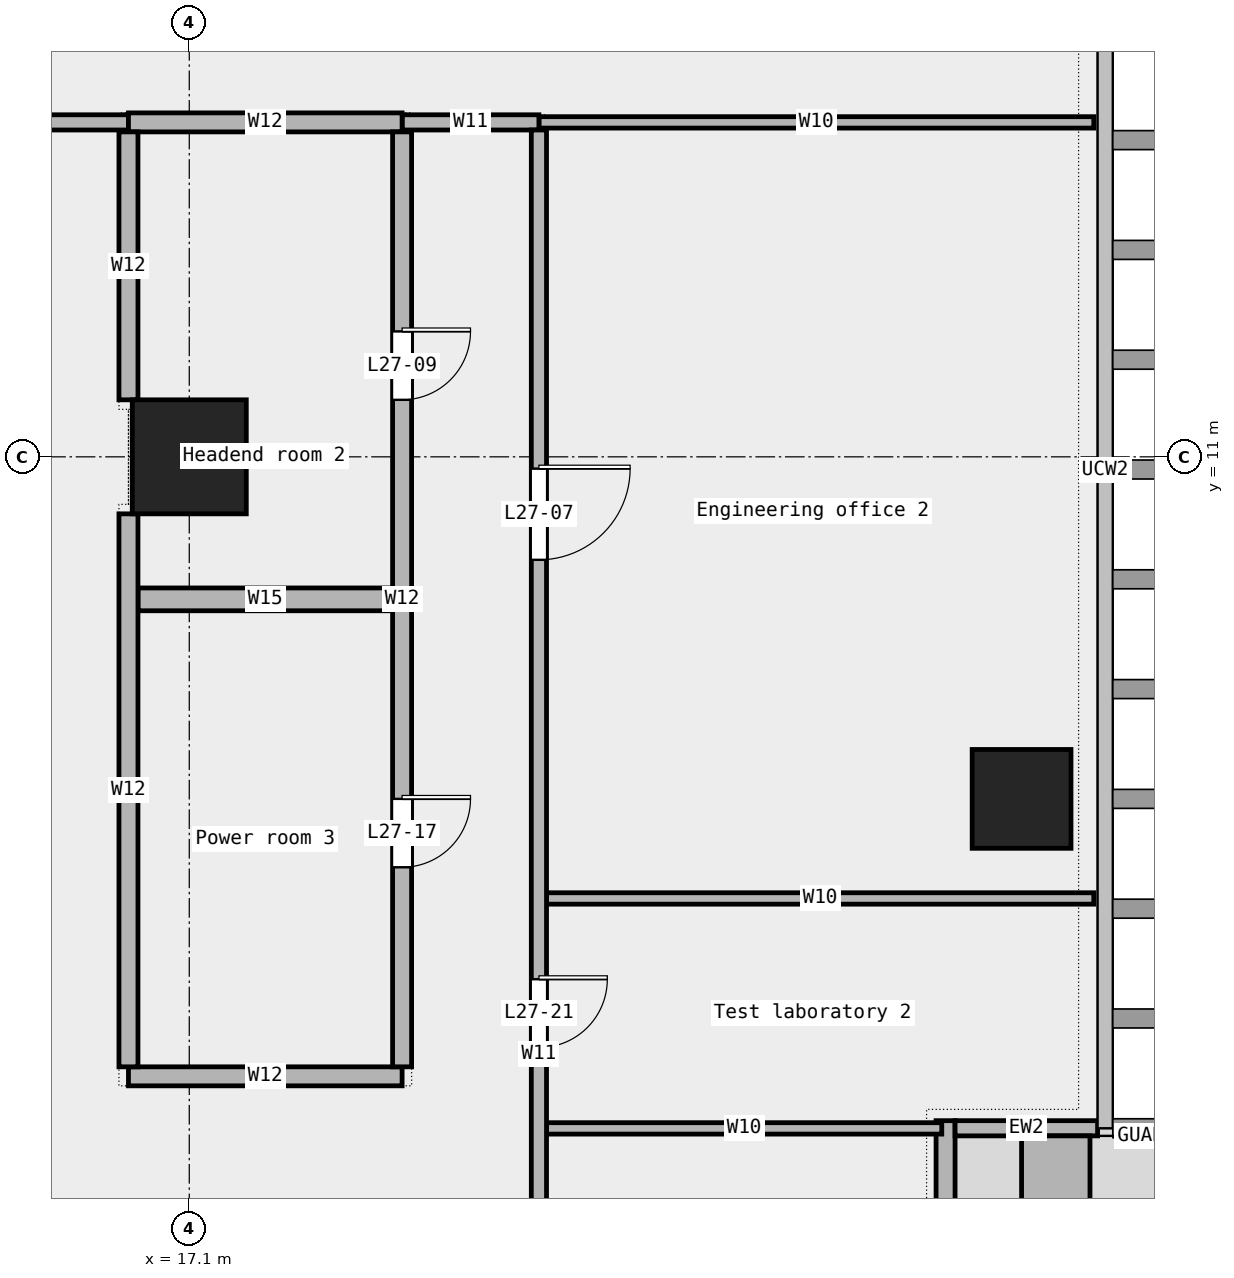
"""IFC4 building model, lengths in metres.
Left out: names, types, materials, properties, quantities, classifications, styles, units other than length and angle.
Written with IfcOpenShell. Run it as: python <this file> out.ifc"""

import sys

from ifc_helpers import new_model, si_unit, direction, frame, frame_2d, origin, origin_2d, place, context, subcontext, project, spatial, rectangle, extrude, element, fill, save


model = new_model("IFC4")
c1 = context("Model", 3, precision=1e-05, world=origin(), true_north=direction((0.0, 1.0)))
c2 = subcontext(c1, "Body", "Model", "MODEL_VIEW")
j1 = project(units=[si_unit("LENGTHUNIT", "METRE"), si_unit("PLANEANGLEUNIT", "RADIAN")], contexts=[c1])
p1 = place(None, origin())
s1 = spatial("IfcSite", under=j1, at=p1, CompositionType="ELEMENT")
p2 = place(p1, origin())
s2 = spatial("IfcBuilding", under=s1, at=p2, CompositionType="ELEMENT")
p3 = place(p2, frame((0.0, 0.0, 135.1)))
s3 = spatial("IfcBuildingStorey", under=s2, at=p3, CompositionType="ELEMENT", Elevation=135.1)
p4 = place(p3, frame((28.05, 6.5, 0.0), z_axis=(0.0, 0.0, 1.0), x_axis=(1.0, 0.0, 0.0)))
e1 = element("IfcColumn", 1, at=p4, inside=s3, PredefinedType="COLUMN", context=c2, shape_type="SweptSolid", body=[
    extrude(rectangle(XDim=1.3, YDim=1.3, at=origin_2d()), origin(), (0.0, 0.0, 1.0), 4.05),
])
p5 = place(p3, frame((17.1, 11.0, 0.0), z_axis=(0.0, 0.0, 1.0), x_axis=(1.0, 0.0, 0.0)))
e2 = element("IfcColumn", 2, at=p5, inside=s3, PredefinedType="COLUMN", context=c2, shape_type="SweptSolid", body=[
    extrude(rectangle(XDim=1.5, YDim=1.5, at=origin_2d()), origin(), (0.0, 0.0, 1.0), 4.05),
])
p6 = place(p3, frame((27.05, -10.933, 0.0), z_axis=(0.0, 0.0, 1.0), x_axis=(0.0, 1.0, 0.0)))
e3 = element("IfcWall", 3, at=p6, inside=s3, PredefinedType="STANDARD", context=c2, shape_type="SweptSolid", body=[
    extrude(rectangle(XDim=13.2, YDim=0.25, at=frame_2d((6.6, 0.0))), origin(), (0.0, 0.0, 1.0), 4.05),
])
p7 = place(p6, frame((1.5, 0.0, 0.45)))
e4 = element("IfcOpeningElement", 4, at=p7, cuts=e3, PredefinedType="OPENING", context=c2, shape_type="SweptSolid", body=[
    extrude(rectangle(XDim=1.5, YDim=3.0, at=frame_2d((0.75, 1.5))), frame((0.0, 0.137, 0.0), z_axis=(0.0, -1.0, 0.0), x_axis=(1.0, 0.0, 0.0)), (0.0, 0.0, 1.0), 0.274),
])
p8 = place(p6, frame((5.75, 0.0, 0.0)))
e5 = element("IfcOpeningElement", 5, at=p8, cuts=e3, PredefinedType="OPENING", context=c2, shape_type="SweptSolid", body=[
    extrude(rectangle(XDim=1.8, YDim=2.4, at=frame_2d((0.9, 1.2))), frame((0.0, 0.137, 0.0), z_axis=(0.0, -1.0, 0.0), x_axis=(1.0, 0.0, 0.0)), (0.0, 0.0, 1.0), 0.274),
])
p9 = place(p6, frame((10.25, 0.0, 0.45)))
e6 = element("IfcOpeningElement", 6, at=p9, cuts=e3, PredefinedType="OPENING", context=c2, shape_type="SweptSolid", body=[
    extrude(rectangle(XDim=1.5, YDim=3.0, at=frame_2d((0.75, 1.5))), frame((0.0, 0.137, 0.0), z_axis=(0.0, -1.0, 0.0), x_axis=(1.0, 0.0, 0.0)), (0.0, 0.0, 1.0), 0.274),
])
p10 = place(p3, frame((29.05, 2.167, 0.0), z_axis=(0.0, 0.0, 1.0), x_axis=(-1.0, 0.0, 0.0)))
e7 = element("IfcWall", 7, at=p10, inside=s3, PredefinedType="STANDARD", context=c2, shape_type="SweptSolid", body=[
    extrude(rectangle(XDim=1.875, YDim=0.2, at=frame_2d((0.938, 0.0))), origin(), (0.0, 0.0, 1.0), 4.05),
])
p11 = place(p3, frame((28.5, -1.533, 0.0), z_axis=(0.0, 0.0, 1.0), x_axis=(0.0, 1.0, 0.0)))
e8 = element("IfcWall", 8, at=p11, inside=s3, PredefinedType="STANDARD", context=c2, shape_type="SweptSolid", body=[
    extrude(rectangle(XDim=3.6, YDim=0.9, at=frame_2d((1.8, 0.0))), origin(), (0.0, 0.0, 1.0), 0.7),
])
p12 = place(p3, frame((21.8, 2.165, 0.0), z_axis=(0.0, 0.0, 1.0), x_axis=(1.0, 0.0, 0.0)))
e9 = element("IfcWall", 9, at=p12, inside=s3, PredefinedType="PARTITIONING", context=c2, shape_type="SweptSolid", body=[
    extrude(rectangle(XDim=5.2, YDim=0.15, at=frame_2d((2.6, 0.0))), origin(), (0.0, 0.0, 1.0), 4.05),
])
p13 = place(p3, frame((16.3, 2.85, 0.0), z_axis=(0.0, 0.0, 1.0), x_axis=(1.0, 0.0, 0.0)))
e10 = element("IfcWall", 10, at=p13, inside=s3, PredefinedType="PARTITIONING", context=c2, shape_type="SweptSolid", body=[
    extrude(rectangle(XDim=3.6, YDim=0.25, at=frame_2d((1.8, 0.0))), origin(), (0.0, 0.0, 1.0), 4.05),
])
p14 = place(p3, frame((21.8, 5.19, 0.0), z_axis=(0.0, 0.0, 1.0), x_axis=(1.0, 0.0, 0.0)))
e11 = element("IfcWall", 11, at=p14, inside=s3, PredefinedType="PARTITIONING", context=c2, shape_type="SweptSolid", body=[
    extrude(rectangle(XDim=7.2, YDim=0.15, at=frame_2d((3.6, 0.0))), origin(), (0.0, 0.0, 1.0), 4.05),
])
p15 = place(p3, frame((16.425, 9.125, 0.0), z_axis=(0.0, 0.0, 1.0), x_axis=(1.0, 0.0, 0.0)))
e12 = element("IfcWall", 12, at=p15, inside=s3, PredefinedType="PARTITIONING", context=c2, shape_type="SweptSolid", body=[
    extrude(rectangle(XDim=3.35, YDim=0.3, at=frame_2d((1.675, 0.0))), origin(), (0.0, 0.0, 1.0), 4.05),
])
p16 = place(p3, frame((21.7, 15.4, 0.0), z_axis=(0.0, 0.0, 1.0), x_axis=(1.0, 0.0, 0.0)))
e13 = element("IfcWall", 13, at=p16, inside=s3, PredefinedType="PARTITIONING", context=c2, shape_type="SweptSolid", body=[
    extrude(rectangle(XDim=7.3, YDim=0.15, at=frame_2d((3.65, 0.0))), origin(), (0.0, 0.0, 1.0), 4.05),
])
p17 = place(p3, frame((9.6, 15.4, 0.0), z_axis=(0.0, 0.0, 1.0), x_axis=(1.0, 0.0, 0.0)))
e14 = element("IfcWall", 14, at=p17, inside=s3, PredefinedType="PARTITIONING", context=c2, shape_type="SweptSolid", body=[
    extrude(rectangle(XDim=6.7, YDim=0.2, at=frame_2d((3.35, 0.0))), origin(), (0.0, 0.0, 1.0), 4.05),
])
p18 = place(p17, frame((2.45, 0.0, 0.0)))
e15 = element("IfcOpeningElement", 15, at=p18, cuts=e14, PredefinedType="OPENING", context=c2, shape_type="SweptSolid", body=[
    extrude(rectangle(XDim=1.8, YDim=2.1, at=frame_2d((0.9, 1.05))), frame((0.0, 0.112, 0.0), z_axis=(0.0, -1.0, 0.0), x_axis=(1.0, 0.0, 0.0)), (0.0, 0.0, 1.0), 0.224),
])
p19 = place(p3, frame((19.9, 15.4, 0.0), z_axis=(0.0, 0.0, 1.0), x_axis=(1.0, 0.0, 0.0)))
e16 = element("IfcWall", 16, at=p19, inside=s3, PredefinedType="PARTITIONING", context=c2, shape_type="SweptSolid", body=[
    extrude(rectangle(XDim=1.8, YDim=0.2, at=frame_2d((0.9, 0.0))), origin(), (0.0, 0.0, 1.0), 4.05),
])
p20 = place(p3, frame((16.3, 15.4, 0.0), z_axis=(0.0, 0.0, 1.0), x_axis=(1.0, 0.0, 0.0)))
e17 = element("IfcWall", 17, at=p20, inside=s3, PredefinedType="PARTITIONING", context=c2, shape_type="SweptSolid", body=[
    extrude(rectangle(XDim=3.6, YDim=0.25, at=frame_2d((1.8, 0.0))), origin(), (0.0, 0.0, 1.0), 4.05),
])
p21 = place(p3, frame((16.3, 2.975, 0.0), z_axis=(0.0, 0.0, 1.0), x_axis=(0.0, 1.0, 0.0)))
e18 = element("IfcWall", 18, at=p21, inside=s3, PredefinedType="PARTITIONING", context=c2, shape_type="SweptSolid", body=[
    extrude(rectangle(XDim=7.275, YDim=0.25, at=frame_2d((3.637, 0.0))), origin(), (0.0, 0.0, 1.0), 4.05),
])
p22 = place(p3, frame((16.3, 11.75, 0.0), z_axis=(0.0, 0.0, 1.0), x_axis=(0.0, 1.0, 0.0)))
e19 = element("IfcWall", 19, at=p22, inside=s3, PredefinedType="PARTITIONING", context=c2, shape_type="SweptSolid", body=[
    extrude(rectangle(XDim=3.525, YDim=0.25, at=frame_2d((1.762, 0.0))), origin(), (0.0, 0.0, 1.0), 4.05),
])
p23 = place(p3, frame((19.9, 2.975, 0.0), z_axis=(0.0, 0.0, 1.0), x_axis=(0.0, 1.0, 0.0)))
e20 = element("IfcWall", 20, at=p23, inside=s3, PredefinedType="PARTITIONING", context=c2, shape_type="SweptSolid", body=[
    extrude(rectangle(XDim=12.3, YDim=0.25, at=frame_2d((6.15, 0.0))), origin(), (0.0, 0.0, 1.0), 4.05),
])
p24 = place(p23, frame((8.775, 0.0, 0.0)))
e21 = element("IfcOpeningElement", 21, at=p24, cuts=e20, PredefinedType="OPENING", context=c2, shape_type="SweptSolid", body=[
    extrude(rectangle(XDim=0.9, YDim=2.1, at=frame_2d((0.45, 1.05))), frame((0.0, 0.137, 0.0), z_axis=(0.0, -1.0, 0.0), x_axis=(1.0, 0.0, 0.0)), (0.0, 0.0, 1.0), 0.274),
])
p25 = place(p23, frame((2.625, 0.0, 0.0)))
e22 = element("IfcOpeningElement", 22, at=p25, cuts=e20, PredefinedType="OPENING", context=c2, shape_type="SweptSolid", body=[
    extrude(rectangle(XDim=0.9, YDim=2.1, at=frame_2d((0.45, 1.05))), frame((0.0, 0.137, 0.0), z_axis=(0.0, -1.0, 0.0), x_axis=(1.0, 0.0, 0.0)), (0.0, 0.0, 1.0), 0.274),
])
p26 = place(p3, frame((21.7, -9.0, 0.0), z_axis=(0.0, 0.0, 1.0), x_axis=(0.0, 1.0, 0.0)))
e23 = element("IfcWall", 23, at=p26, inside=s3, PredefinedType="PARTITIONING", context=c2, shape_type="SweptSolid", body=[
    extrude(rectangle(XDim=24.3, YDim=0.2, at=frame_2d((12.15, 0.0))), origin(), (0.0, 0.0, 1.0), 4.05),
])
p27 = place(p26, frame((18.645, 0.0, 0.0)))
e24 = element("IfcOpeningElement", 24, at=p27, cuts=e23, PredefinedType="OPENING", context=c2, shape_type="SweptSolid", body=[
    extrude(rectangle(XDim=1.2, YDim=2.1, at=frame_2d((0.6, 1.05))), frame((0.0, 0.112, 0.0), z_axis=(0.0, -1.0, 0.0), x_axis=(1.0, 0.0, 0.0)), (0.0, 0.0, 1.0), 0.224),
])
p28 = place(p26, frame((4.833, 0.0, 0.0)))
e25 = element("IfcOpeningElement", 25, at=p28, cuts=e23, PredefinedType="OPENING", context=c2, shape_type="SweptSolid", body=[
    extrude(rectangle(XDim=1.5, YDim=2.1, at=frame_2d((0.75, 1.05))), frame((0.0, 0.112, 0.0), z_axis=(0.0, -1.0, 0.0), x_axis=(1.0, 0.0, 0.0)), (0.0, 0.0, 1.0), 0.224),
])
p29 = place(p26, frame((12.228, 0.0, 0.0)))
e26 = element("IfcOpeningElement", 26, at=p29, cuts=e23, PredefinedType="OPENING", context=c2, shape_type="SweptSolid", body=[
    extrude(rectangle(XDim=0.9, YDim=2.1, at=frame_2d((0.45, 1.05))), frame((0.0, 0.112, 0.0), z_axis=(0.0, -1.0, 0.0), x_axis=(1.0, 0.0, 0.0)), (0.0, 0.0, 1.0), 0.224),
])
p30 = place(p27, origin())
e27 = element("IfcDoor", 27, at=p30, inside=s3, OperationType="SINGLE_SWING_LEFT", PredefinedType="DOOR", context=c2, shape_type="SweptSolid", body=[
    extrude(rectangle(XDim=1.2, YDim=2.1, at=frame_2d((0.6, 1.05))), frame((0.0, 0.025, 0.0), z_axis=(0.0, -1.0, 0.0), x_axis=(1.0, 0.0, 0.0)), (0.0, 0.0, 1.0), 0.05),
])
fill(e24, e27)
p31 = place(p24, origin())
e28 = element("IfcDoor", 28, at=p31, inside=s3, OperationType="SINGLE_SWING_LEFT", PredefinedType="DOOR", context=c2, shape_type="SweptSolid", body=[
    extrude(rectangle(XDim=0.9, YDim=2.1, at=frame_2d((0.45, 1.05))), frame((0.0, 0.025, 0.0), z_axis=(0.0, -1.0, 0.0), x_axis=(1.0, 0.0, 0.0)), (0.0, 0.0, 1.0), 0.05),
])
fill(e21, e28)
p32 = place(p25, origin())
e29 = element("IfcDoor", 29, at=p32, inside=s3, OperationType="SINGLE_SWING_LEFT", PredefinedType="DOOR", context=c2, shape_type="SweptSolid", body=[
    extrude(rectangle(XDim=0.9, YDim=2.1, at=frame_2d((0.45, 1.05))), frame((0.0, 0.025, 0.0), z_axis=(0.0, -1.0, 0.0), x_axis=(1.0, 0.0, 0.0)), (0.0, 0.0, 1.0), 0.05),
])
fill(e22, e29)
p33 = place(p29, origin())
e30 = element("IfcDoor", 30, at=p33, inside=s3, OperationType="SINGLE_SWING_LEFT", PredefinedType="DOOR", context=c2, shape_type="SweptSolid", body=[
    extrude(rectangle(XDim=0.9, YDim=2.1, at=frame_2d((0.45, 1.05))), frame((0.0, 0.025, 0.0), z_axis=(0.0, -1.0, 0.0), x_axis=(1.0, 0.0, 0.0)), (0.0, 0.0, 1.0), 0.05),
])
fill(e26, e30)
save(model, sys.argv[1])
